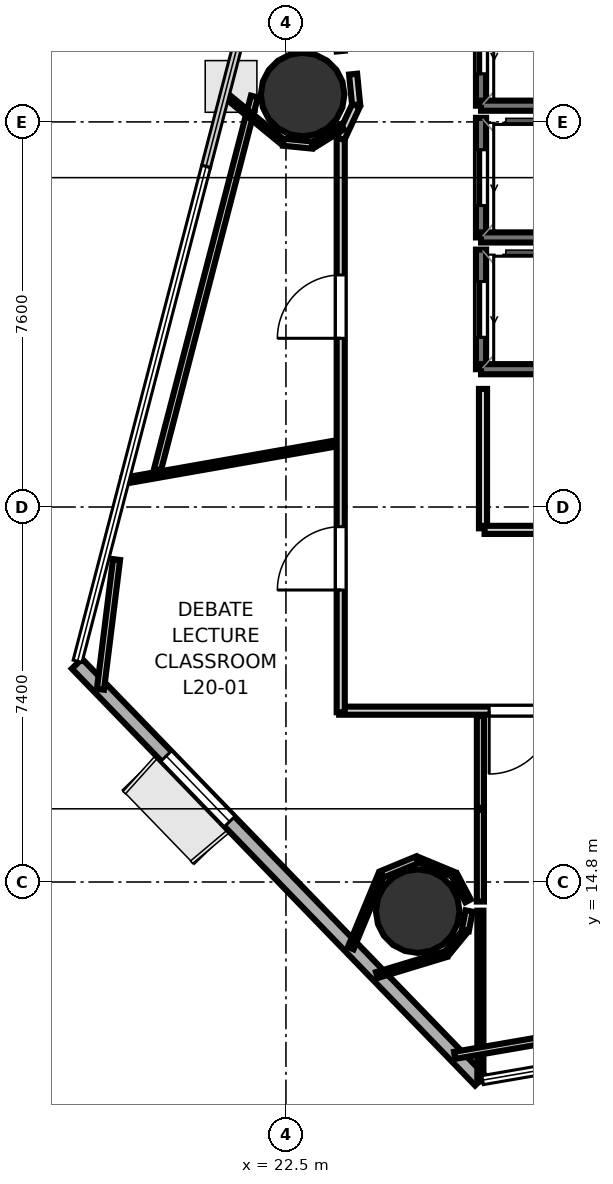
"""IFC4 building model, lengths in metres.
Left out: names, types, materials, properties, quantities, classifications, styles, units other than length and angle.
Written with IfcOpenShell. Run it as: python <this file> out.ifc"""

import sys

from ifc_helpers import new_model, si_unit, direction, frame, frame_2d, origin, origin_2d, place, context, subcontext, project, spatial, rectangle, hollow_circle, extrude, element, fill, save


model = new_model("IFC4")
c1 = context("Model", 3, precision=1e-05, world=origin(), true_north=direction((0.0, 1.0)))
c2 = subcontext(c1, "Body", "Model", "MODEL_VIEW")
j1 = project(units=[si_unit("LENGTHUNIT", "METRE"), si_unit("PLANEANGLEUNIT", "RADIAN")], contexts=[c1])
p1 = place(None, origin())
s1 = spatial("IfcSite", under=j1, at=p1, CompositionType="ELEMENT")
p2 = place(p1, origin())
s2 = spatial("IfcBuilding", under=s1, at=p2, CompositionType="ELEMENT")
p3 = place(p2, frame((0.0, 0.0, 82.1)))
s3 = spatial("IfcBuildingStorey", under=s2, at=p3, CompositionType="ELEMENT", Elevation=82.1)
for number, where, z_axis, x_axis in (
    (1, (22.829, 30.34, 0.0), (0.0, 0.0, 1.0), (1.0, 0.0, 0.0)),
    (2, (25.1, 14.225, 0.0), (0.0, 0.0, 1.0), (1.0, 0.0, 0.0)),
):
    element("IfcColumn", number, at=place(p3, frame(where, z_axis=z_axis, x_axis=x_axis)), inside=s3, PredefinedType="COLUMN", context=c2, shape_type="SweptSolid", body=[
        extrude(hollow_circle(Radius=0.825, WallThickness=0.04, at=origin_2d()), origin(), (0.0, 0.0, 1.0), 3.7),
    ])
p4 = place(p3, frame((18.375, 19.107, 0.0), z_axis=(0.0, 0.0, 1.0), x_axis=(0.695331524054, -0.718689134228, 0.0)))
e3 = element("IfcWall", 3, at=p4, inside=s3, PredefinedType="SOLIDWALL", context=c2, shape_type="SweptSolid", body=[
    extrude(rectangle(XDim=11.445, YDim=0.28, at=frame_2d((5.723, 0.0))), origin(), (0.0, 0.0, 1.0), 3.52),
])
p5 = place(p4, frame((2.533, 0.0, 0.85)))
e4 = element("IfcOpeningElement", 4, at=p5, cuts=e3, PredefinedType="OPENING", context=c2, shape_type="SweptSolid", body=[
    extrude(rectangle(XDim=1.8, YDim=2.1, at=frame_2d((0.9, 1.05))), frame((0.0, 0.15, 0.0), z_axis=(0.0, -1.0, 0.0), x_axis=(1.0, 0.0, 0.0)), (0.0, 0.0, 1.0), 0.3),
])
p6 = place(p3, frame((26.35, 30.12, 0.0), z_axis=(0.0, 0.0, 1.0), x_axis=(0.0, 1.0, 0.0)))
e5 = element("IfcWall", 5, at=p6, inside=s3, PredefinedType="SOLIDWALL", context=c2, shape_type="SweptSolid", body=[
    extrude(rectangle(XDim=2.36, YDim=0.2, at=frame_2d((1.18, 0.0))), origin(), (0.0, 0.0, 1.0), 3.52),
])
p7 = place(p6, frame((0.63, 0.0, 0.0)))
e6 = element("IfcOpeningElement", 6, at=p7, cuts=e5, PredefinedType="OPENING", context=c2, shape_type="SweptSolid", body=[
    extrude(rectangle(XDim=1.1, YDim=2.15, at=frame_2d((0.55, 1.075))), frame((0.0, 0.11, 0.0), z_axis=(0.0, -1.0, 0.0), x_axis=(1.0, 0.0, 0.0)), (0.0, 0.0, 1.0), 0.22),
])
p8 = place(p3, frame((26.35, 30.12, 0.0), z_axis=(0.0, 0.0, 1.0), x_axis=(1.0, 0.0, 0.0)))
e7 = element("IfcWall", 7, at=p8, inside=s3, PredefinedType="SOLIDWALL", context=c2, shape_type="SweptSolid", body=[
    extrude(rectangle(XDim=2.1, YDim=0.2, at=frame_2d((1.05, 0.0))), origin(), (0.0, 0.0, 1.0), 3.52),
])
p9 = place(p3, frame((26.35, 27.52, 0.0), z_axis=(0.0, 0.0, 1.0), x_axis=(0.0, 1.0, 0.0)))
e8 = element("IfcWall", 8, at=p9, inside=s3, PredefinedType="SOLIDWALL", context=c2, shape_type="SweptSolid", body=[
    extrude(rectangle(XDim=2.36, YDim=0.2, at=frame_2d((1.18, 0.0))), origin(), (0.0, 0.0, 1.0), 3.52),
])
p10 = place(p9, frame((0.63, 0.0, 0.0)))
e9 = element("IfcOpeningElement", 9, at=p10, cuts=e8, PredefinedType="OPENING", context=c2, shape_type="SweptSolid", body=[
    extrude(rectangle(XDim=1.1, YDim=2.15, at=frame_2d((0.55, 1.075))), frame((0.0, 0.11, 0.0), z_axis=(0.0, -1.0, 0.0), x_axis=(1.0, 0.0, 0.0)), (0.0, 0.0, 1.0), 0.22),
])
p11 = place(p3, frame((26.35, 27.52, 0.0), z_axis=(0.0, 0.0, 1.0), x_axis=(1.0, 0.0, 0.0)))
e10 = element("IfcWall", 10, at=p11, inside=s3, PredefinedType="SOLIDWALL", context=c2, shape_type="SweptSolid", body=[
    extrude(rectangle(XDim=2.1, YDim=0.2, at=frame_2d((1.05, 0.0))), origin(), (0.0, 0.0, 1.0), 3.52),
])
p12 = place(p3, frame((26.35, 24.92, 0.0), z_axis=(0.0, 0.0, 1.0), x_axis=(0.0, 1.0, 0.0)))
e11 = element("IfcWall", 11, at=p12, inside=s3, PredefinedType="SOLIDWALL", context=c2, shape_type="SweptSolid", body=[
    extrude(rectangle(XDim=2.36, YDim=0.2, at=frame_2d((1.18, 0.0))), origin(), (0.0, 0.0, 1.0), 3.52),
])
p13 = place(p12, frame((0.63, 0.0, 0.0)))
e12 = element("IfcOpeningElement", 12, at=p13, cuts=e11, PredefinedType="OPENING", context=c2, shape_type="SweptSolid", body=[
    extrude(rectangle(XDim=1.1, YDim=2.15, at=frame_2d((0.55, 1.075))), frame((0.0, 0.11, 0.0), z_axis=(0.0, -1.0, 0.0), x_axis=(1.0, 0.0, 0.0)), (0.0, 0.0, 1.0), 0.22),
])
p14 = place(p3, frame((26.35, 24.92, 0.0), z_axis=(0.0, 0.0, 1.0), x_axis=(1.0, 0.0, 0.0)))
e13 = element("IfcWall", 13, at=p14, inside=s3, PredefinedType="SOLIDWALL", context=c2, shape_type="SweptSolid", body=[
    extrude(rectangle(XDim=2.1, YDim=0.2, at=frame_2d((1.05, 0.0))), origin(), (0.0, 0.0, 1.0), 3.52),
])
p15 = place(p3, frame((26.389, 24.531, 0.0), z_axis=(0.0, 0.0, 1.0), x_axis=(0.0, -1.0, 0.0)))
e14 = element("IfcWall", 14, at=p15, inside=s3, PredefinedType="PARTITIONING", context=c2, shape_type="SweptSolid", body=[
    extrude(rectangle(XDim=2.75, YDim=0.16, at=frame_2d((1.375, 0.0))), origin(), (0.0, 0.0, 1.0), 2.84),
])
p16 = place(p3, frame((26.42, 21.749, 0.0), z_axis=(0.0, 0.0, 1.0), x_axis=(1.0, 0.0, 0.0)))
e15 = element("IfcWall", 15, at=p16, inside=s3, PredefinedType="PARTITIONING", context=c2, shape_type="SweptSolid", body=[
    extrude(rectangle(XDim=3.28, YDim=0.16, at=frame_2d((1.64, 0.0))), origin(), (0.0, 0.0, 1.0), 2.84),
])
p17 = place(p3, frame((33.32, 18.181, 0.0), z_axis=(0.0, 0.0, 1.0), x_axis=(-1.0, 0.0, 0.0)))
e16 = element("IfcWall", 16, at=p17, inside=s3, PredefinedType="PARTITIONING", context=c2, shape_type="SweptSolid", body=[
    extrude(rectangle(XDim=9.77, YDim=0.16, at=frame_2d((4.885, 0.0))), origin(), (0.0, 0.0, 1.0), 2.798),
])
p18 = place(p17, frame((5.559, 0.0, 0.0)))
e17 = element("IfcOpeningElement", 17, at=p18, cuts=e16, PredefinedType="OPENING", context=c2, shape_type="SweptSolid", body=[
    extrude(rectangle(XDim=1.25, YDim=2.2, at=frame_2d((0.625, 1.1))), frame((0.0, 0.09, 0.0), z_axis=(0.0, -1.0, 0.0), x_axis=(1.0, 0.0, 0.0)), (0.0, 0.0, 1.0), 0.18),
])
p19 = place(p3, frame((23.581, 18.15, 0.0), z_axis=(0.0, 0.0, 1.0), x_axis=(0.0, 1.0, 0.0)))
e18 = element("IfcWall", 18, at=p19, inside=s3, PredefinedType="PARTITIONING", context=c2, shape_type="SweptSolid", body=[
    extrude(rectangle(XDim=11.333, YDim=0.16, at=frame_2d((5.667, 0.0))), origin(), (0.0, 0.0, 1.0), 2.798),
])
p20 = place(p19, frame((2.412, 0.0, 0.0)))
e19 = element("IfcOpeningElement", 19, at=p20, cuts=e18, PredefinedType="OPENING", context=c2, shape_type="SweptSolid", body=[
    extrude(rectangle(XDim=1.25, YDim=2.2, at=frame_2d((0.625, 1.1))), frame((0.0, 0.09, 0.0), z_axis=(0.0, -1.0, 0.0), x_axis=(1.0, 0.0, 0.0)), (0.0, 0.0, 1.0), 0.18),
])
p21 = place(p19, frame((7.38, 0.0, 0.0)))
e20 = element("IfcOpeningElement", 20, at=p21, cuts=e18, PredefinedType="OPENING", context=c2, shape_type="SweptSolid", body=[
    extrude(rectangle(XDim=1.25, YDim=2.2, at=frame_2d((0.625, 1.1))), frame((0.0, 0.09, 0.0), z_axis=(0.0, -1.0, 0.0), x_axis=(1.0, 0.0, 0.0)), (0.0, 0.0, 1.0), 0.18),
])
p22 = place(p3, frame((23.578, 29.47, 0.0), z_axis=(0.0, 0.0, 1.0), x_axis=(0.421827918194, 0.906675910914, 0.0)))
e21 = element("IfcWall", 21, at=p22, inside=s3, PredefinedType="PARTITIONING", context=c2, shape_type="SweptSolid", body=[
    extrude(rectangle(XDim=0.72, YDim=0.16, at=frame_2d((0.36, 0.0))), origin(), (0.0, 0.0, 1.0), 2.84),
])
p23 = place(p3, frame((23.885, 30.139, 0.0), z_axis=(0.0, 0.0, 1.0), x_axis=(-0.0981888168, 0.995167803064, 0.0)))
e22 = element("IfcWall", 22, at=p23, inside=s3, PredefinedType="PARTITIONING", context=c2, shape_type="SweptSolid", body=[
    extrude(rectangle(XDim=0.607, YDim=0.16, at=frame_2d((0.303, 0.0))), origin(), (0.0, 0.0, 1.0), 2.84),
])
p24 = place(p3, frame((26.337, 18.074, 0.0), z_axis=(0.0, 0.0, 1.0), x_axis=(0.0, -1.0, 0.0)))
e23 = element("IfcWall", 23, at=p24, inside=s3, PredefinedType="PARTITIONING", context=c2, shape_type="SweptSolid", body=[
    extrude(rectangle(XDim=3.66, YDim=0.14, at=frame_2d((1.83, 0.0))), origin(), (0.0, 0.0, 1.0), 2.798),
])
p25 = place(p3, frame((26.094, 14.428, 0.0), z_axis=(0.0, 0.0, 1.0), x_axis=(-0.468979373437, 0.883209118663, 0.0)))
e24 = element("IfcWall", 24, at=p25, inside=s3, PredefinedType="PARTITIONING", context=c2, shape_type="SweptSolid", body=[
    extrude(rectangle(XDim=0.575, YDim=0.12, at=frame_2d((0.288, 0.0))), origin(), (0.0, 0.0, 1.0), 2.798),
])
p26 = place(p3, frame((25.808, 14.95, 0.0), z_axis=(0.0, 0.0, 1.0), x_axis=(-0.923965532966, 0.382475742879, 0.0)))
e25 = element("IfcWall", 25, at=p26, inside=s3, PredefinedType="PARTITIONING", context=c2, shape_type="SweptSolid", body=[
    extrude(rectangle(XDim=0.754, YDim=0.105, at=frame_2d((0.377, 0.0))), origin(), (0.0, 0.0, 1.0), 2.798),
])
p27 = place(p3, frame((25.088, 15.239, 0.0), z_axis=(0.0, 0.0, 1.0), x_axis=(-0.923965532966, -0.382475742879, 0.0)))
e26 = element("IfcWall", 26, at=p27, inside=s3, PredefinedType="PARTITIONING", context=c2, shape_type="SweptSolid", body=[
    extrude(rectangle(XDim=0.754, YDim=0.14, at=frame_2d((0.377, 0.0))), origin(), (0.0, 0.0, 1.0), 2.798),
])
p28 = place(p3, frame((24.375, 14.933, 0.0), z_axis=(0.0, 0.0, 1.0), x_axis=(-0.382799602582, -0.923831404675, 0.0)))
e27 = element("IfcWall", 27, at=p28, inside=s3, PredefinedType="PARTITIONING", context=c2, shape_type="SweptSolid", body=[
    extrude(rectangle(XDim=1.557, YDim=0.12, at=frame_2d((0.778, 0.0))), origin(), (0.0, 0.0, 1.0), 2.84),
])
p29 = place(p3, frame((24.294, 12.963, 0.0), z_axis=(0.0, 0.0, 1.0), x_axis=(0.956943566799, 0.290274025641, 0.0)))
e28 = element("IfcWall", 28, at=p29, inside=s3, PredefinedType="PARTITIONING", context=c2, shape_type="SweptSolid", body=[
    extrude(rectangle(XDim=1.423, YDim=0.12, at=frame_2d((0.711, 0.0))), origin(), (0.0, 0.0, 1.0), 2.84),
])
p30 = place(p3, frame((25.671, 13.386, 0.0), z_axis=(0.0, 0.0, 1.0), x_axis=(0.634329694458, 0.773062635709, 0.0)))
e29 = element("IfcWall", 29, at=p30, inside=s3, PredefinedType="PARTITIONING", context=c2, shape_type="SweptSolid", body=[
    extrude(rectangle(XDim=0.572, YDim=0.105, at=frame_2d((0.286, 0.0))), origin(), (0.0, 0.0, 1.0), 2.84),
])
p31 = place(p3, frame((26.041, 13.842, 0.0), z_axis=(0.0, 0.0, 1.0), x_axis=(0.188455212737, 0.982081785185, 0.0)))
e30 = element("IfcWall", 30, at=p31, inside=s3, PredefinedType="PARTITIONING", context=c2, shape_type="SweptSolid", body=[
    extrude(rectangle(XDim=0.393, YDim=0.14, at=frame_2d((0.196, 0.0))), origin(), (0.0, 0.0, 1.0), 2.798),
])
p32 = place(p3, frame((26.337, 14.234, 0.0), z_axis=(0.0, 0.0, 1.0), x_axis=(0.0, -1.0, 0.0)))
e31 = element("IfcWall", 31, at=p32, inside=s3, PredefinedType="PARTITIONING", context=c2, shape_type="SweptSolid", body=[
    extrude(rectangle(XDim=3.372, YDim=0.12, at=frame_2d((1.686, 0.0))), origin(), (0.0, 0.0, 1.0), 2.798),
])
p33 = place(p3, frame((18.839, 18.603, 0.0), z_axis=(0.0, 0.0, 1.0), x_axis=(0.123266239111, 0.992373636437, 0.0)))
e32 = element("IfcWall", 32, at=p33, inside=s3, PredefinedType="PARTITIONING", context=c2, shape_type="SweptSolid", body=[
    extrude(rectangle(XDim=2.581, YDim=0.14, at=frame_2d((1.291, 0.0))), origin(), (0.0, 0.0, 1.0), 2.84),
])
p34 = place(p3, frame((19.293, 22.716, 0.0), z_axis=(0.0, 0.0, 1.0), x_axis=(0.984812483343, 0.173621348494, 0.0)))
e33 = element("IfcWall", 33, at=p34, inside=s3, PredefinedType="PARTITIONING", context=c2, shape_type="SweptSolid", body=[
    extrude(rectangle(XDim=4.247, YDim=0.12, at=frame_2d((2.123, 0.0))), origin(), (0.0, 0.0, 1.0), 2.84),
])
p35 = place(p3, frame((55.914, 16.572, 0.0), z_axis=(0.0, 0.0, 1.0), x_axis=(-0.9854284719, -0.170090348841, 0.0)))
e34 = element("IfcWall", 34, at=p35, inside=s3, PredefinedType="PARTITIONING", context=c2, shape_type="SweptSolid", body=[
    extrude(rectangle(XDim=30.53, YDim=0.14, at=frame_2d((15.265, 0.0))), origin(), (0.0, 0.0, 1.0), 2.798),
])
p36 = place(p3, frame((19.965, 22.938, 0.0), z_axis=(0.0, 0.0, 1.0), x_axis=(0.251390945638, 0.96788562984, 0.0)))
e35 = element("IfcWall", 35, at=p36, inside=s3, PredefinedType="PARTITIONING", context=c2, shape_type="SweptSolid", body=[
    extrude(rectangle(XDim=7.607, YDim=0.14, at=frame_2d((3.804, 0.0))), origin(), (0.0, 0.0, 1.0), 2.798),
])
p37 = place(p3, frame((21.277, 30.354, 0.0), z_axis=(0.0, 0.0, 1.0), x_axis=(0.7730466664, -0.634349155882, 0.0)))
e36 = element("IfcWall", 36, at=p37, inside=s3, PredefinedType="PARTITIONING", context=c2, shape_type="SweptSolid", body=[
    extrude(rectangle(XDim=1.494, YDim=0.105, at=frame_2d((0.747, 0.0))), origin(), (0.0, 0.0, 1.0), 2.798),
])
p38 = place(p3, frame((22.449, 29.399, 0.0), z_axis=(0.0, 0.0, 1.0), x_axis=(0.995167364461, -0.098193262045, 0.0)))
e37 = element("IfcWall", 37, at=p38, inside=s3, PredefinedType="PARTITIONING", context=c2, shape_type="SweptSolid", body=[
    extrude(rectangle(XDim=0.572, YDim=0.14, at=frame_2d((0.286, 0.0))), origin(), (0.0, 0.0, 1.0), 2.798),
])
p39 = place(p3, frame((23.038, 29.348, 0.0), z_axis=(0.0, 0.0, 1.0), x_axis=(0.850157603054, 0.526528299306, 0.0)))
e38 = element("IfcWall", 38, at=p39, inside=s3, PredefinedType="PARTITIONING", context=c2, shape_type="SweptSolid", body=[
    extrude(rectangle(XDim=0.677, YDim=0.12, at=frame_2d((0.339, 0.0))), origin(), (0.0, 0.0, 1.0), 2.798),
])
p40 = place(p7, origin())
e39 = element("IfcDoor", 39, at=p40, inside=s3, OperationType="SLIDING_TO_LEFT", PredefinedType="DOOR", context=c2, shape_type="SweptSolid", body=[
    extrude(rectangle(XDim=1.1, YDim=2.15, at=frame_2d((0.55, 1.075))), frame((0.0, 0.025, 0.0), z_axis=(0.0, -1.0, 0.0), x_axis=(1.0, 0.0, 0.0)), (0.0, 0.0, 1.0), 0.05),
])
fill(e6, e39)
p41 = place(p10, origin())
e40 = element("IfcDoor", 40, at=p41, inside=s3, OperationType="SLIDING_TO_LEFT", PredefinedType="DOOR", context=c2, shape_type="SweptSolid", body=[
    extrude(rectangle(XDim=1.1, YDim=2.15, at=frame_2d((0.55, 1.075))), frame((0.0, 0.025, 0.0), z_axis=(0.0, -1.0, 0.0), x_axis=(1.0, 0.0, 0.0)), (0.0, 0.0, 1.0), 0.05),
])
fill(e9, e40)
p42 = place(p13, origin())
e41 = element("IfcDoor", 41, at=p42, inside=s3, OperationType="SLIDING_TO_LEFT", PredefinedType="DOOR", context=c2, shape_type="SweptSolid", body=[
    extrude(rectangle(XDim=1.1, YDim=2.15, at=frame_2d((0.55, 1.075))), frame((0.0, 0.025, 0.0), z_axis=(0.0, -1.0, 0.0), x_axis=(1.0, 0.0, 0.0)), (0.0, 0.0, 1.0), 0.05),
])
fill(e12, e41)
p43 = place(p20, origin())
e42 = element("IfcDoor", 42, at=p43, inside=s3, OperationType="SINGLE_SWING_LEFT", PredefinedType="DOOR", context=c2, shape_type="SweptSolid", body=[
    extrude(rectangle(XDim=1.25, YDim=2.2, at=frame_2d((0.625, 1.1))), frame((0.0, 0.025, 0.0), z_axis=(0.0, -1.0, 0.0), x_axis=(1.0, 0.0, 0.0)), (0.0, 0.0, 1.0), 0.05),
])
fill(e19, e42)
p44 = place(p18, origin())
e43 = element("IfcDoor", 43, at=p44, inside=s3, OperationType="SINGLE_SWING_RIGHT", PredefinedType="DOOR", context=c2, shape_type="SweptSolid", body=[
    extrude(rectangle(XDim=1.25, YDim=2.2, at=frame_2d((0.625, 1.1))), frame((0.0, 0.025, 0.0), z_axis=(0.0, -1.0, 0.0), x_axis=(1.0, 0.0, 0.0)), (0.0, 0.0, 1.0), 0.05),
])
fill(e17, e43)
p45 = place(p21, origin())
e44 = element("IfcDoor", 44, at=p45, inside=s3, OperationType="SINGLE_SWING_LEFT", PredefinedType="DOOR", context=c2, shape_type="SweptSolid", body=[
    extrude(rectangle(XDim=1.25, YDim=2.2, at=frame_2d((0.625, 1.1))), frame((0.0, 0.025, 0.0), z_axis=(0.0, -1.0, 0.0), x_axis=(1.0, 0.0, 0.0)), (0.0, 0.0, 1.0), 0.05),
])
fill(e20, e44)
p46 = place(p5, origin())
e45 = element("IfcWindow", 45, at=p46, inside=s3, PartitioningType="SINGLE_PANEL", PredefinedType="WINDOW", context=c2, shape_type="SweptSolid", body=[
    extrude(rectangle(XDim=1.8, YDim=2.1, at=frame_2d((0.9, 1.05))), frame((0.0, 0.03, 0.0), z_axis=(0.0, -1.0, 0.0), x_axis=(1.0, 0.0, 0.0)), (0.0, 0.0, 1.0), 0.06),
])
fill(e4, e45)
save(model, sys.argv[1])
